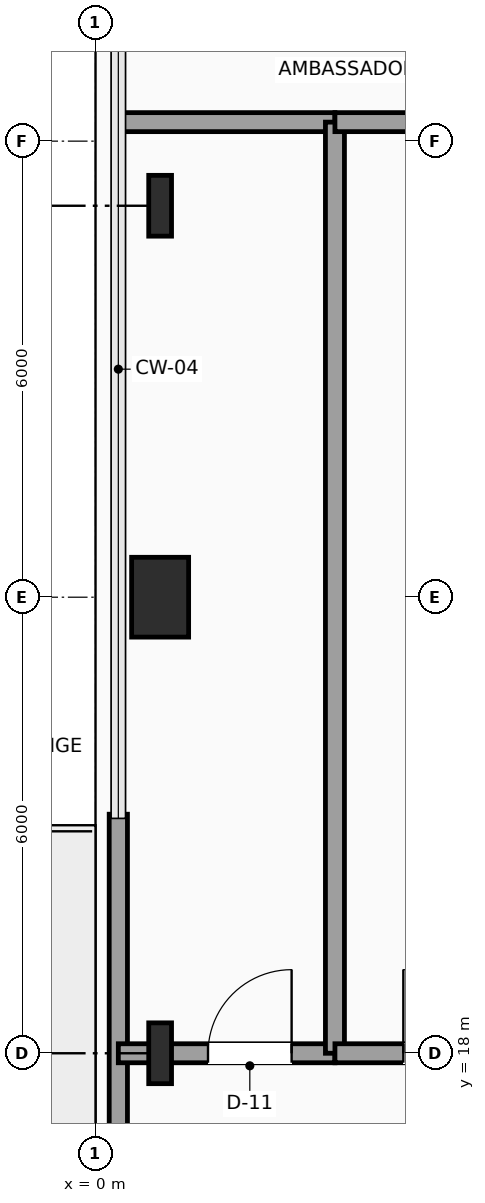
"""IFC4 building model, lengths in metres.
Left out: names, types, materials, properties, quantities, classifications, styles, units other than length and angle.
Written with IfcOpenShell. Run it as: python <this file> out.ifc"""

import sys

from ifc_helpers import new_model, si_unit, direction, frame, frame_2d, origin, origin_2d, place, context, subcontext, project, spatial, rectangle, i_section, extrude, element, fill, save


model = new_model("IFC4")
c1 = context("Model", 3, precision=1e-05, world=origin(), true_north=direction((0.0, 1.0)))
c2 = subcontext(c1, "Body", "Model", "MODEL_VIEW")
j1 = project(units=[si_unit("LENGTHUNIT", "METRE"), si_unit("PLANEANGLEUNIT", "RADIAN")], contexts=[c1])
p1 = place(None, origin())
s1 = spatial("IfcSite", under=j1, at=p1, CompositionType="ELEMENT")
p2 = place(p1, origin())
s2 = spatial("IfcBuilding", under=s1, at=p2, CompositionType="ELEMENT")
p3 = place(p2, frame((0.0, 0.0, 187.95)))
s3 = spatial("IfcBuildingStorey", under=s2, at=p3, CompositionType="ELEMENT", Elevation=187.95)
p4 = place(p3, frame((0.85, 18.0, 0.0), z_axis=(0.0, 0.0, 1.0), x_axis=(1.0, 0.0, 0.0)))
e1 = element("IfcColumn", 1, at=p4, inside=s3, PredefinedType="COLUMN", context=c2, shape_type="SweptSolid", body=[
    extrude(i_section(OverallWidth=0.3, OverallDepth=0.8, WebThickness=0.018, FlangeThickness=0.033, FilletRadius=0.03, at=origin_2d()), origin(), (0.0, 0.0, 1.0), 3.75),
])
p5 = place(p3, frame((0.85, 24.0, 0.0), z_axis=(0.0, 0.0, 1.0), x_axis=(1.0, 0.0, 0.0)))
e2 = element("IfcColumn", 2, at=p5, inside=s3, PredefinedType="COLUMN", context=c2, shape_type="SweptSolid", body=[
    extrude(rectangle(XDim=0.75, YDim=1.05, at=origin_2d()), origin(), (0.0, 0.0, 1.0), 3.75),
])
p6 = place(p3, frame((0.85, 29.15, 0.0), z_axis=(0.0, 0.0, 1.0), x_axis=(1.0, 0.0, 0.0)))
e3 = element("IfcColumn", 3, at=p6, inside=s3, PredefinedType="COLUMN", context=c2, shape_type="SweptSolid", body=[
    extrude(i_section(OverallWidth=0.3, OverallDepth=0.8, WebThickness=0.018, FlangeThickness=0.033, FilletRadius=0.03, at=origin_2d()), origin(), (0.0, 0.0, 1.0), 3.75),
])
p7 = place(p3, frame((0.3, 11.855, 0.0), z_axis=(0.0, 0.0, 1.0), x_axis=(0.0, 1.0, 0.0)))
e4 = element("IfcWall", 4, at=p7, inside=s3, PredefinedType="SOLIDWALL", context=c2, shape_type="SweptSolid", body=[
    extrude(rectangle(XDim=9.29, YDim=0.24, at=frame_2d((4.645, 0.0))), origin(), (0.0, 0.0, 1.0), 3.54),
])
p8 = place(p7, frame((2.7, 0.0, 0.0)))
e5 = element("IfcOpeningElement", 5, at=p8, cuts=e4, PredefinedType="OPENING", context=c2, shape_type="SweptSolid", body=[
    extrude(rectangle(XDim=1.05, YDim=2.2, at=frame_2d((0.525, 1.1))), frame((0.0, 0.13, 0.0), z_axis=(0.0, -1.0, 0.0), x_axis=(1.0, 0.0, 0.0)), (0.0, 0.0, 1.0), 0.26),
])
p9 = place(p3, frame((0.3, 18.0, 0.0), z_axis=(0.0, 0.0, 1.0), x_axis=(1.0, 0.0, 0.0)))
e6 = element("IfcWall", 6, at=p9, inside=s3, PredefinedType="PARTITIONING", context=c2, shape_type="SweptSolid", body=[
    extrude(rectangle(XDim=2.85, YDim=0.25, at=frame_2d((1.425, 0.0))), origin(), (0.0, 0.0, 1.0), 3.132),
])
p10 = place(p9, frame((1.18, 0.0, 0.0)))
e7 = element("IfcOpeningElement", 7, at=p10, cuts=e6, PredefinedType="OPENING", context=c2, shape_type="SweptSolid", body=[
    extrude(rectangle(XDim=1.1, YDim=2.25, at=frame_2d((0.55, 1.125))), frame((0.0, 0.135, 0.0), z_axis=(0.0, -1.0, 0.0), x_axis=(1.0, 0.0, 0.0)), (0.0, 0.0, 1.0), 0.27),
])
p11 = place(p3, frame((0.3, 30.25, 0.0), z_axis=(0.0, 0.0, 1.0), x_axis=(1.0, 0.0, 0.0)))
e8 = element("IfcWall", 8, at=p11, inside=s3, PredefinedType="PARTITIONING", context=c2, shape_type="SweptSolid", body=[
    extrude(rectangle(XDim=2.85, YDim=0.25, at=frame_2d((1.425, 0.0))), origin(), (0.0, 0.0, 1.0), 3.54),
])
p12 = place(p3, frame((3.15, 18.0, 0.0), z_axis=(0.0, 0.0, 1.0), x_axis=(0.0, 1.0, 0.0)))
e9 = element("IfcWall", 9, at=p12, inside=s3, PredefinedType="PARTITIONING", context=c2, shape_type="SweptSolid", body=[
    extrude(rectangle(XDim=12.25, YDim=0.25, at=frame_2d((6.125, 0.0))), origin(), (0.0, 0.0, 1.0), 3.54),
])
p13 = place(p3, frame((3.15, 18.0, 0.0), z_axis=(0.0, 0.0, 1.0), x_axis=(1.0, 0.0, 0.0)))
e10 = element("IfcWall", 10, at=p13, inside=s3, PredefinedType="PARTITIONING", context=c2, shape_type="SweptSolid", body=[
    extrude(rectangle(XDim=2.8, YDim=0.25, at=frame_2d((1.4, 0.0))), origin(), (0.0, 0.0, 1.0), 3.132),
])
p14 = place(p13, frame((0.9, 0.0, 0.0)))
e11 = element("IfcOpeningElement", 11, at=p14, cuts=e10, PredefinedType="OPENING", context=c2, shape_type="SweptSolid", body=[
    extrude(rectangle(XDim=1.1, YDim=2.25, at=frame_2d((0.55, 1.125))), frame((0.0, 0.135, 0.0), z_axis=(0.0, -1.0, 0.0), x_axis=(1.0, 0.0, 0.0)), (0.0, 0.0, 1.0), 0.27),
])
p15 = place(p3, frame((3.15, 30.25, 0.0), z_axis=(0.0, 0.0, 1.0), x_axis=(1.0, 0.0, 0.0)))
e12 = element("IfcWall", 12, at=p15, inside=s3, PredefinedType="PARTITIONING", context=c2, shape_type="SweptSolid", body=[
    extrude(rectangle(XDim=2.8, YDim=0.25, at=frame_2d((1.4, 0.0))), origin(), (0.0, 0.0, 1.0), 3.54),
])
p16 = place(p10, origin())
e13 = element("IfcDoor", 13, at=p16, inside=s3, OperationType="SINGLE_SWING_RIGHT", PredefinedType="DOOR", context=c2, shape_type="SweptSolid", body=[
    extrude(rectangle(XDim=1.1, YDim=2.25, at=frame_2d((0.55, 1.125))), frame((0.0, 0.025, 0.0), z_axis=(0.0, -1.0, 0.0), x_axis=(1.0, 0.0, 0.0)), (0.0, 0.0, 1.0), 0.05),
])
fill(e7, e13)
p17 = place(p14, origin())
e14 = element("IfcDoor", 14, at=p17, inside=s3, OperationType="SINGLE_SWING_LEFT", PredefinedType="DOOR", context=c2, shape_type="SweptSolid", body=[
    extrude(rectangle(XDim=1.1, YDim=2.25, at=frame_2d((0.55, 1.125))), frame((0.0, 0.025, 0.0), z_axis=(0.0, -1.0, 0.0), x_axis=(1.0, 0.0, 0.0)), (0.0, 0.0, 1.0), 0.05),
])
fill(e11, e14)
save(model, sys.argv[1])
